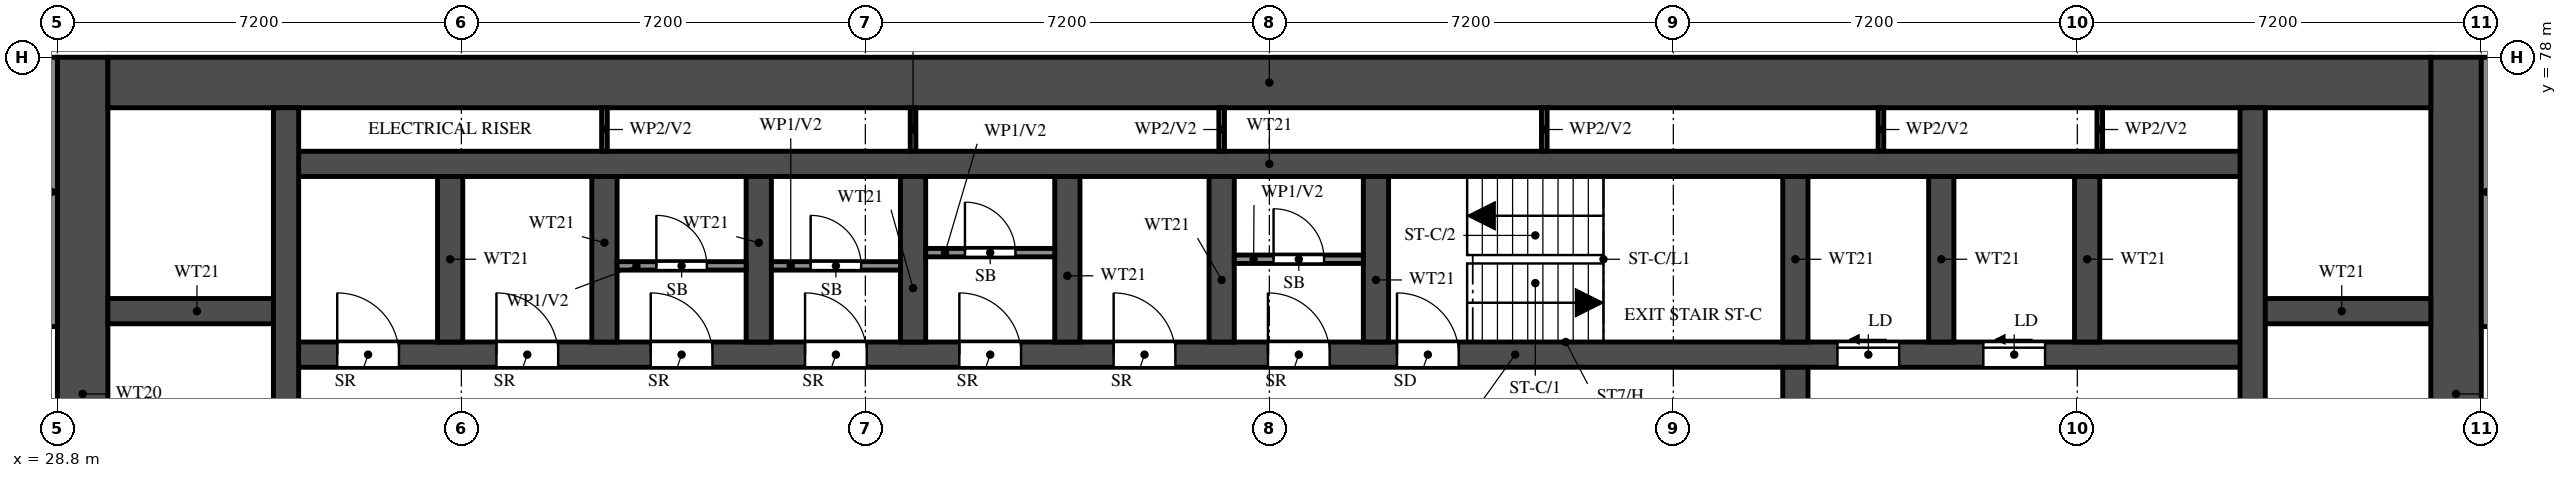
"""IFC4 building model, lengths in metres.
Left out: names, types, materials, properties, quantities, classifications, styles, units other than length and angle.
Written with IfcOpenShell. Run it as: python <this file> out.ifc"""

import sys

from ifc_helpers import new_model, si_unit, direction, frame, frame_2d, origin, place, context, subcontext, project, spatial, rectangle, extrude, element, fill, save


model = new_model("IFC4")
c1 = context("Model", 3, precision=1e-05, world=origin(), true_north=direction((0.0, 1.0)))
c2 = subcontext(c1, "Body", "Model", "MODEL_VIEW")
j1 = project(units=[si_unit("LENGTHUNIT", "METRE"), si_unit("PLANEANGLEUNIT", "RADIAN")], contexts=[c1])
p1 = place(None, origin())
s1 = spatial("IfcSite", under=j1, at=p1, CompositionType="ELEMENT")
p2 = place(p1, origin())
s2 = spatial("IfcBuilding", under=s1, at=p2, CompositionType="ELEMENT")
p3 = place(p2, frame((0.0, 0.0, 62.0)))
s3 = spatial("IfcBuildingStorey", under=s2, at=p3, CompositionType="ELEMENT", Elevation=62.0)
for number, where, z_axis, x_axis in (
    (1, (29.25, 66.0, 0.0), (0.0, 0.0, 1.0), (0.0, 1.0, 0.0)),
    (2, (71.55, 66.0, 0.0), (0.0, 0.0, 1.0), (0.0, 1.0, 0.0)),
):
    element("IfcWall", number, at=place(p3, frame(where, z_axis=z_axis, x_axis=x_axis)), inside=s3, PredefinedType="SHEAR", context=c2, shape_type="SweptSolid", body=[
        extrude(rectangle(XDim=12.0, YDim=0.9, at=frame_2d((6.0, 0.0))), origin(), (0.0, 0.0, 1.0), 3.18),
    ])
p4 = place(p3, frame((29.7, 77.55, 0.0), z_axis=(0.0, 0.0, 1.0), x_axis=(1.0, 0.0, 0.0)))
e3 = element("IfcWall", 3, at=p4, inside=s3, PredefinedType="SHEAR", context=c2, shape_type="SweptSolid", body=[
    extrude(rectangle(XDim=41.4, YDim=0.9, at=frame_2d((20.7, 0.0))), origin(), (0.0, 0.0, 1.0), 3.18),
])
p5 = place(p3, frame((32.875, 72.7, 0.0), z_axis=(0.0, 0.0, 1.0), x_axis=(1.0, 0.0, 0.0)))
e4 = element("IfcWall", 4, at=p5, inside=s3, PredefinedType="SHEAR", context=c2, shape_type="SweptSolid", body=[
    extrude(rectangle(XDim=35.05, YDim=0.45, at=frame_2d((17.525, 0.0))), origin(), (0.0, 0.0, 1.0), 3.18),
])
p6 = place(p5, frame((19.8, 0.0, 0.0)))
e5 = element("IfcOpeningElement", 5, at=p6, cuts=e4, PredefinedType="OPENING", context=c2, shape_type="SweptSolid", body=[
    extrude(rectangle(XDim=1.1, YDim=2.1, at=frame_2d((0.55, 1.05))), frame((0.0, 0.235, 0.0), z_axis=(0.0, -1.0, 0.0), x_axis=(1.0, 0.0, 0.0)), (0.0, 0.0, 1.0), 0.47),
])
p7 = place(p5, frame((27.65, 0.0, 0.0)))
e6 = element("IfcOpeningElement", 6, at=p7, cuts=e4, PredefinedType="OPENING", context=c2, shape_type="SweptSolid", body=[
    extrude(rectangle(XDim=1.1, YDim=2.1, at=frame_2d((0.55, 1.05))), frame((0.0, 0.235, 0.0), z_axis=(0.0, -1.0, 0.0), x_axis=(1.0, 0.0, 0.0)), (0.0, 0.0, 1.0), 0.47),
])
p8 = place(p5, frame((30.25, 0.0, 0.0)))
e7 = element("IfcOpeningElement", 7, at=p8, cuts=e4, PredefinedType="OPENING", context=c2, shape_type="SweptSolid", body=[
    extrude(rectangle(XDim=1.1, YDim=2.1, at=frame_2d((0.55, 1.05))), frame((0.0, 0.235, 0.0), z_axis=(0.0, -1.0, 0.0), x_axis=(1.0, 0.0, 0.0)), (0.0, 0.0, 1.0), 0.47),
])
p9 = place(p5, frame((3.75, 0.0, 0.0)))
e8 = element("IfcOpeningElement", 8, at=p9, cuts=e4, PredefinedType="OPENING", context=c2, shape_type="SweptSolid", body=[
    extrude(rectangle(XDim=1.1, YDim=2.1, at=frame_2d((0.55, 1.05))), frame((0.0, 0.235, 0.0), z_axis=(0.0, -1.0, 0.0), x_axis=(1.0, 0.0, 0.0)), (0.0, 0.0, 1.0), 0.47),
])
p10 = place(p5, frame((6.5, 0.0, 0.0)))
e9 = element("IfcOpeningElement", 9, at=p10, cuts=e4, PredefinedType="OPENING", context=c2, shape_type="SweptSolid", body=[
    extrude(rectangle(XDim=1.1, YDim=2.1, at=frame_2d((0.55, 1.05))), frame((0.0, 0.235, 0.0), z_axis=(0.0, -1.0, 0.0), x_axis=(1.0, 0.0, 0.0)), (0.0, 0.0, 1.0), 0.47),
])
p11 = place(p5, frame((9.25, 0.0, 0.0)))
e10 = element("IfcOpeningElement", 10, at=p11, cuts=e4, PredefinedType="OPENING", context=c2, shape_type="SweptSolid", body=[
    extrude(rectangle(XDim=1.1, YDim=2.1, at=frame_2d((0.55, 1.05))), frame((0.0, 0.235, 0.0), z_axis=(0.0, -1.0, 0.0), x_axis=(1.0, 0.0, 0.0)), (0.0, 0.0, 1.0), 0.47),
])
p12 = place(p5, frame((12.0, 0.0, 0.0)))
e11 = element("IfcOpeningElement", 11, at=p12, cuts=e4, PredefinedType="OPENING", context=c2, shape_type="SweptSolid", body=[
    extrude(rectangle(XDim=1.1, YDim=2.1, at=frame_2d((0.55, 1.05))), frame((0.0, 0.235, 0.0), z_axis=(0.0, -1.0, 0.0), x_axis=(1.0, 0.0, 0.0)), (0.0, 0.0, 1.0), 0.47),
])
p13 = place(p5, frame((14.75, 0.0, 0.0)))
e12 = element("IfcOpeningElement", 12, at=p13, cuts=e4, PredefinedType="OPENING", context=c2, shape_type="SweptSolid", body=[
    extrude(rectangle(XDim=1.1, YDim=2.1, at=frame_2d((0.55, 1.05))), frame((0.0, 0.235, 0.0), z_axis=(0.0, -1.0, 0.0), x_axis=(1.0, 0.0, 0.0)), (0.0, 0.0, 1.0), 0.47),
])
p14 = place(p5, frame((17.5, 0.0, 0.0)))
e13 = element("IfcOpeningElement", 13, at=p14, cuts=e4, PredefinedType="OPENING", context=c2, shape_type="SweptSolid", body=[
    extrude(rectangle(XDim=1.1, YDim=2.1, at=frame_2d((0.55, 1.05))), frame((0.0, 0.235, 0.0), z_axis=(0.0, -1.0, 0.0), x_axis=(1.0, 0.0, 0.0)), (0.0, 0.0, 1.0), 0.47),
])
p15 = place(p5, frame((0.913, 0.0, 0.0)))
e14 = element("IfcOpeningElement", 14, at=p15, cuts=e4, PredefinedType="OPENING", context=c2, shape_type="SweptSolid", body=[
    extrude(rectangle(XDim=1.1, YDim=2.1, at=frame_2d((0.55, 1.05))), frame((0.0, 0.235, 0.0), z_axis=(0.0, -1.0, 0.0), x_axis=(1.0, 0.0, 0.0)), (0.0, 0.0, 1.0), 0.47),
])
p16 = place(p3, frame((32.875, 76.1, 0.0), z_axis=(0.0, 0.0, 1.0), x_axis=(1.0, 0.0, 0.0)))
e15 = element("IfcWall", 15, at=p16, inside=s3, PredefinedType="SHEAR", context=c2, shape_type="SweptSolid", body=[
    extrude(rectangle(XDim=35.05, YDim=0.45, at=frame_2d((17.525, 0.0))), origin(), (0.0, 0.0, 1.0), 3.18),
])
for number, where, z_axis, x_axis in (
    (16, (29.7, 73.475, 0.0), (0.0, 0.0, 1.0), (1.0, 0.0, 0.0)),
    (17, (67.925, 73.475, 0.0), (0.0, 0.0, 1.0), (1.0, 0.0, 0.0)),
):
    element("IfcWall", number, at=place(p3, frame(where, z_axis=z_axis, x_axis=x_axis)), inside=s3, PredefinedType="SHEAR", context=c2, shape_type="SweptSolid", body=[
        extrude(rectangle(XDim=3.175, YDim=0.45, at=frame_2d((1.587, 0.0))), origin(), (0.0, 0.0, 1.0), 3.18),
    ])
p17 = place(p3, frame((32.875, 66.45, 0.0), z_axis=(0.0, 0.0, 1.0), x_axis=(0.0, 1.0, 0.0)))
e18 = element("IfcWall", 18, at=p17, inside=s3, PredefinedType="SHEAR", context=c2, shape_type="SweptSolid", body=[
    extrude(rectangle(XDim=10.65, YDim=0.45, at=frame_2d((5.325, 0.0))), origin(), (0.0, 0.0, 1.0), 3.18),
])
p18 = place(p3, frame((67.925, 66.45, 0.0), z_axis=(0.0, 0.0, 1.0), x_axis=(0.0, 1.0, 0.0)))
e19 = element("IfcWall", 19, at=p18, inside=s3, PredefinedType="SHEAR", context=c2, shape_type="SweptSolid", body=[
    extrude(rectangle(XDim=10.65, YDim=0.45, at=frame_2d((5.325, 0.0))), origin(), (0.0, 0.0, 1.0), 3.18),
])
p19 = place(p18, frame((0.15, 0.0, 0.0)))
e20 = element("IfcOpeningElement", 20, at=p19, cuts=e19, PredefinedType="OPENING", context=c2, shape_type="SweptSolid", body=[
    extrude(rectangle(XDim=1.1, YDim=2.1, at=frame_2d((0.55, 1.05))), frame((0.0, 0.235, 0.0), z_axis=(0.0, -1.0, 0.0), x_axis=(1.0, 0.0, 0.0)), (0.0, 0.0, 1.0), 0.47),
])
p20 = place(p3, frame((59.775, 66.45, 0.0), z_axis=(0.0, 0.0, 1.0), x_axis=(0.0, 1.0, 0.0)))
e21 = element("IfcWall", 21, at=p20, inside=s3, PredefinedType="SHEAR", context=c2, shape_type="SweptSolid", body=[
    extrude(rectangle(XDim=6.025, YDim=0.45, at=frame_2d((3.013, 0.0))), origin(), (0.0, 0.0, 1.0), 3.18),
])
p21 = place(p20, frame((3.85, 0.0, 0.0)))
e22 = element("IfcOpeningElement", 22, at=p21, cuts=e21, PredefinedType="OPENING", context=c2, shape_type="SweptSolid", body=[
    extrude(rectangle(XDim=1.2, YDim=2.1, at=frame_2d((0.6, 1.05))), frame((0.0, 0.235, 0.0), z_axis=(0.0, -1.0, 0.0), x_axis=(1.0, 0.0, 0.0)), (0.0, 0.0, 1.0), 0.47),
])
for number, where, z_axis, x_axis in (
    (23, (59.775, 72.925, 0.0), (0.0, 0.0, 1.0), (0.0, 1.0, 0.0)),
    (24, (35.8, 72.925, 0.0), (0.0, 0.0, 1.0), (0.0, 1.0, 0.0)),
    (25, (38.55, 72.925, 0.0), (0.0, 0.0, 1.0), (0.0, 1.0, 0.0)),
    (26, (41.3, 72.925, 0.0), (0.0, 0.0, 1.0), (0.0, 1.0, 0.0)),
    (27, (44.05, 72.925, 0.0), (0.0, 0.0, 1.0), (0.0, 1.0, 0.0)),
    (28, (46.8, 72.925, 0.0), (0.0, 0.0, 1.0), (0.0, 1.0, 0.0)),
    (29, (49.55, 72.925, 0.0), (0.0, 0.0, 1.0), (0.0, 1.0, 0.0)),
    (30, (52.3, 72.925, 0.0), (0.0, 0.0, 1.0), (0.0, 1.0, 0.0)),
    (31, (62.375, 72.925, 0.0), (0.0, 0.0, 1.0), (0.0, 1.0, 0.0)),
    (32, (64.975, 72.925, 0.0), (0.0, 0.0, 1.0), (0.0, 1.0, 0.0)),
):
    element("IfcWall", number, at=place(p3, frame(where, z_axis=z_axis, x_axis=x_axis)), inside=s3, PredefinedType="SHEAR", context=c2, shape_type="SweptSolid", body=[
        extrude(rectangle(XDim=2.95, YDim=0.45, at=frame_2d((1.475, 0.0))), origin(), (0.0, 0.0, 1.0), 3.18),
    ])
p22 = place(p3, frame((38.775, 74.282, 0.0), z_axis=(0.0, 0.0, 1.0), x_axis=(1.0, 0.0, 0.0)))
e33 = element("IfcWall", 33, at=p22, inside=s3, PredefinedType="PARTITIONING", context=c2, shape_type="SweptSolid", body=[
    extrude(rectangle(XDim=2.3, YDim=0.15, at=frame_2d((1.15, 0.0))), origin(), (0.0, 0.0, 1.0), 3.18),
])
p23 = place(p22, frame((0.7, 0.0, 0.0)))
e34 = element("IfcOpeningElement", 34, at=p23, cuts=e33, PredefinedType="OPENING", context=c2, shape_type="SweptSolid", body=[
    extrude(rectangle(XDim=0.9, YDim=2.1, at=frame_2d((0.45, 1.05))), frame((0.0, 0.085, 0.0), z_axis=(0.0, -1.0, 0.0), x_axis=(1.0, 0.0, 0.0)), (0.0, 0.0, 1.0), 0.17),
])
p24 = place(p3, frame((41.525, 74.282, 0.0), z_axis=(0.0, 0.0, 1.0), x_axis=(1.0, 0.0, 0.0)))
e35 = element("IfcWall", 35, at=p24, inside=s3, PredefinedType="PARTITIONING", context=c2, shape_type="SweptSolid", body=[
    extrude(rectangle(XDim=2.3, YDim=0.15, at=frame_2d((1.15, 0.0))), origin(), (0.0, 0.0, 1.0), 3.18),
])
p25 = place(p24, frame((0.7, 0.0, 0.0)))
e36 = element("IfcOpeningElement", 36, at=p25, cuts=e35, PredefinedType="OPENING", context=c2, shape_type="SweptSolid", body=[
    extrude(rectangle(XDim=0.9, YDim=2.1, at=frame_2d((0.45, 1.05))), frame((0.0, 0.085, 0.0), z_axis=(0.0, -1.0, 0.0), x_axis=(1.0, 0.0, 0.0)), (0.0, 0.0, 1.0), 0.17),
])
p26 = place(p3, frame((44.275, 74.518, 0.0), z_axis=(0.0, 0.0, 1.0), x_axis=(1.0, 0.0, 0.0)))
e37 = element("IfcWall", 37, at=p26, inside=s3, PredefinedType="PARTITIONING", context=c2, shape_type="SweptSolid", body=[
    extrude(rectangle(XDim=2.3, YDim=0.15, at=frame_2d((1.15, 0.0))), origin(), (0.0, 0.0, 1.0), 3.18),
])
p27 = place(p26, frame((0.7, 0.0, 0.0)))
e38 = element("IfcOpeningElement", 38, at=p27, cuts=e37, PredefinedType="OPENING", context=c2, shape_type="SweptSolid", body=[
    extrude(rectangle(XDim=0.9, YDim=2.1, at=frame_2d((0.45, 1.05))), frame((0.0, 0.085, 0.0), z_axis=(0.0, -1.0, 0.0), x_axis=(1.0, 0.0, 0.0)), (0.0, 0.0, 1.0), 0.17),
])
p28 = place(p3, frame((49.775, 74.4, 0.0), z_axis=(0.0, 0.0, 1.0), x_axis=(1.0, 0.0, 0.0)))
e39 = element("IfcWall", 39, at=p28, inside=s3, PredefinedType="PARTITIONING", context=c2, shape_type="SweptSolid", body=[
    extrude(rectangle(XDim=2.3, YDim=0.15, at=frame_2d((1.15, 0.0))), origin(), (0.0, 0.0, 1.0), 3.18),
])
p29 = place(p28, frame((0.7, 0.0, 0.0)))
e40 = element("IfcOpeningElement", 40, at=p29, cuts=e39, PredefinedType="OPENING", context=c2, shape_type="SweptSolid", body=[
    extrude(rectangle(XDim=0.9, YDim=2.1, at=frame_2d((0.45, 1.05))), frame((0.0, 0.085, 0.0), z_axis=(0.0, -1.0, 0.0), x_axis=(1.0, 0.0, 0.0)), (0.0, 0.0, 1.0), 0.17),
])
for number, where, z_axis, x_axis in (
    (41, (38.55, 76.325, 0.0), (0.0, 0.0, 1.0), (0.0, 1.0, 0.0)),
    (42, (44.05, 76.325, 0.0), (0.0, 0.0, 1.0), (0.0, 1.0, 0.0)),
    (43, (49.55, 76.325, 0.0), (0.0, 0.0, 1.0), (0.0, 1.0, 0.0)),
    (44, (55.3, 76.325, 0.0), (0.0, 0.0, 1.0), (0.0, 1.0, 0.0)),
    (45, (61.3, 76.325, 0.0), (0.0, 0.0, 1.0), (0.0, 1.0, 0.0)),
    (46, (65.2, 76.325, 0.0), (0.0, 0.0, 1.0), (0.0, 1.0, 0.0)),
):
    element("IfcWall", number, at=place(p3, frame(where, z_axis=z_axis, x_axis=x_axis)), inside=s3, PredefinedType="PARTITIONING", context=c2, shape_type="SweptSolid", body=[
        extrude(rectangle(XDim=0.775, YDim=0.1, at=frame_2d((0.388, 0.0))), origin(), (0.0, 0.0, 1.0), 3.18),
    ])
for number, where, z_axis, x_axis in (
    (47, (28.7, 73.2, 0.0), (0.0, 0.0, 1.0), (0.0, 1.0, 0.0)),
    (48, (72.1, 73.2, 0.0), (0.0, 0.0, 1.0), (0.0, 1.0, 0.0)),
):
    element("IfcWall", number, at=place(p3, frame(where, z_axis=z_axis, x_axis=x_axis)), inside=s3, PredefinedType="SOLIDWALL", context=c2, shape_type="SweptSolid", body=[
        extrude(rectangle(XDim=4.8, YDim=0.2, at=frame_2d((2.4, 0.0))), origin(), (0.0, 0.0, 1.0), 3.18),
    ])
p30 = place(p6, origin())
e49 = element("IfcDoor", 49, at=p30, inside=s3, OperationType="SINGLE_SWING_LEFT", PredefinedType="DOOR", context=c2, shape_type="SweptSolid", body=[
    extrude(rectangle(XDim=1.1, YDim=2.1, at=frame_2d((0.55, 1.05))), frame((0.0, 0.025, 0.0), z_axis=(0.0, -1.0, 0.0), x_axis=(1.0, 0.0, 0.0)), (0.0, 0.0, 1.0), 0.05),
])
fill(e5, e49)
p31 = place(p7, origin())
e50 = element("IfcDoor", 50, at=p31, inside=s3, OperationType="SLIDING_TO_LEFT", PredefinedType="DOOR", context=c2, shape_type="SweptSolid", body=[
    extrude(rectangle(XDim=1.1, YDim=2.1, at=frame_2d((0.55, 1.05))), frame((0.0, 0.025, 0.0), z_axis=(0.0, -1.0, 0.0), x_axis=(1.0, 0.0, 0.0)), (0.0, 0.0, 1.0), 0.05),
])
fill(e6, e50)
p32 = place(p8, origin())
e51 = element("IfcDoor", 51, at=p32, inside=s3, OperationType="SLIDING_TO_LEFT", PredefinedType="DOOR", context=c2, shape_type="SweptSolid", body=[
    extrude(rectangle(XDim=1.1, YDim=2.1, at=frame_2d((0.55, 1.05))), frame((0.0, 0.025, 0.0), z_axis=(0.0, -1.0, 0.0), x_axis=(1.0, 0.0, 0.0)), (0.0, 0.0, 1.0), 0.05),
])
fill(e7, e51)
p33 = place(p9, origin())
e52 = element("IfcDoor", 52, at=p33, inside=s3, OperationType="SINGLE_SWING_LEFT", PredefinedType="DOOR", context=c2, shape_type="SweptSolid", body=[
    extrude(rectangle(XDim=1.1, YDim=2.1, at=frame_2d((0.55, 1.05))), frame((0.0, 0.025, 0.0), z_axis=(0.0, -1.0, 0.0), x_axis=(1.0, 0.0, 0.0)), (0.0, 0.0, 1.0), 0.05),
])
fill(e8, e52)
p34 = place(p10, origin())
e53 = element("IfcDoor", 53, at=p34, inside=s3, OperationType="SINGLE_SWING_LEFT", PredefinedType="DOOR", context=c2, shape_type="SweptSolid", body=[
    extrude(rectangle(XDim=1.1, YDim=2.1, at=frame_2d((0.55, 1.05))), frame((0.0, 0.025, 0.0), z_axis=(0.0, -1.0, 0.0), x_axis=(1.0, 0.0, 0.0)), (0.0, 0.0, 1.0), 0.05),
])
fill(e9, e53)
p35 = place(p23, origin())
e54 = element("IfcDoor", 54, at=p35, inside=s3, OperationType="SINGLE_SWING_RIGHT", PredefinedType="DOOR", context=c2, shape_type="SweptSolid", body=[
    extrude(rectangle(XDim=0.9, YDim=2.1, at=frame_2d((0.45, 1.05))), frame((0.0, 0.025, 0.0), z_axis=(0.0, -1.0, 0.0), x_axis=(1.0, 0.0, 0.0)), (0.0, 0.0, 1.0), 0.05),
])
fill(e34, e54)
p36 = place(p11, origin())
e55 = element("IfcDoor", 55, at=p36, inside=s3, OperationType="SINGLE_SWING_LEFT", PredefinedType="DOOR", context=c2, shape_type="SweptSolid", body=[
    extrude(rectangle(XDim=1.1, YDim=2.1, at=frame_2d((0.55, 1.05))), frame((0.0, 0.025, 0.0), z_axis=(0.0, -1.0, 0.0), x_axis=(1.0, 0.0, 0.0)), (0.0, 0.0, 1.0), 0.05),
])
fill(e10, e55)
p37 = place(p25, origin())
e56 = element("IfcDoor", 56, at=p37, inside=s3, OperationType="SINGLE_SWING_LEFT", PredefinedType="DOOR", context=c2, shape_type="SweptSolid", body=[
    extrude(rectangle(XDim=0.9, YDim=2.1, at=frame_2d((0.45, 1.05))), frame((0.0, 0.025, 0.0), z_axis=(0.0, -1.0, 0.0), x_axis=(1.0, 0.0, 0.0)), (0.0, 0.0, 1.0), 0.05),
])
fill(e36, e56)
p38 = place(p12, origin())
e57 = element("IfcDoor", 57, at=p38, inside=s3, OperationType="SINGLE_SWING_LEFT", PredefinedType="DOOR", context=c2, shape_type="SweptSolid", body=[
    extrude(rectangle(XDim=1.1, YDim=2.1, at=frame_2d((0.55, 1.05))), frame((0.0, 0.025, 0.0), z_axis=(0.0, -1.0, 0.0), x_axis=(1.0, 0.0, 0.0)), (0.0, 0.0, 1.0), 0.05),
])
fill(e11, e57)
p39 = place(p27, origin())
e58 = element("IfcDoor", 58, at=p39, inside=s3, OperationType="SINGLE_SWING_LEFT", PredefinedType="DOOR", context=c2, shape_type="SweptSolid", body=[
    extrude(rectangle(XDim=0.9, YDim=2.1, at=frame_2d((0.45, 1.05))), frame((0.0, 0.025, 0.0), z_axis=(0.0, -1.0, 0.0), x_axis=(1.0, 0.0, 0.0)), (0.0, 0.0, 1.0), 0.05),
])
fill(e38, e58)
p40 = place(p13, origin())
e59 = element("IfcDoor", 59, at=p40, inside=s3, OperationType="SINGLE_SWING_LEFT", PredefinedType="DOOR", context=c2, shape_type="SweptSolid", body=[
    extrude(rectangle(XDim=1.1, YDim=2.1, at=frame_2d((0.55, 1.05))), frame((0.0, 0.025, 0.0), z_axis=(0.0, -1.0, 0.0), x_axis=(1.0, 0.0, 0.0)), (0.0, 0.0, 1.0), 0.05),
])
fill(e12, e59)
p41 = place(p14, origin())
e60 = element("IfcDoor", 60, at=p41, inside=s3, OperationType="SINGLE_SWING_LEFT", PredefinedType="DOOR", context=c2, shape_type="SweptSolid", body=[
    extrude(rectangle(XDim=1.1, YDim=2.1, at=frame_2d((0.55, 1.05))), frame((0.0, 0.025, 0.0), z_axis=(0.0, -1.0, 0.0), x_axis=(1.0, 0.0, 0.0)), (0.0, 0.0, 1.0), 0.05),
])
fill(e13, e60)
p42 = place(p29, origin())
e61 = element("IfcDoor", 61, at=p42, inside=s3, OperationType="SINGLE_SWING_RIGHT", PredefinedType="DOOR", context=c2, shape_type="SweptSolid", body=[
    extrude(rectangle(XDim=0.9, YDim=2.1, at=frame_2d((0.45, 1.05))), frame((0.0, 0.025, 0.0), z_axis=(0.0, -1.0, 0.0), x_axis=(1.0, 0.0, 0.0)), (0.0, 0.0, 1.0), 0.05),
])
fill(e40, e61)
p43 = place(p15, origin())
e62 = element("IfcDoor", 62, at=p43, inside=s3, OperationType="SINGLE_SWING_LEFT", PredefinedType="DOOR", context=c2, shape_type="SweptSolid", body=[
    extrude(rectangle(XDim=1.1, YDim=2.1, at=frame_2d((0.55, 1.05))), frame((0.0, 0.025, 0.0), z_axis=(0.0, -1.0, 0.0), x_axis=(1.0, 0.0, 0.0)), (0.0, 0.0, 1.0), 0.05),
])
fill(e14, e62)
save(model, sys.argv[1])
